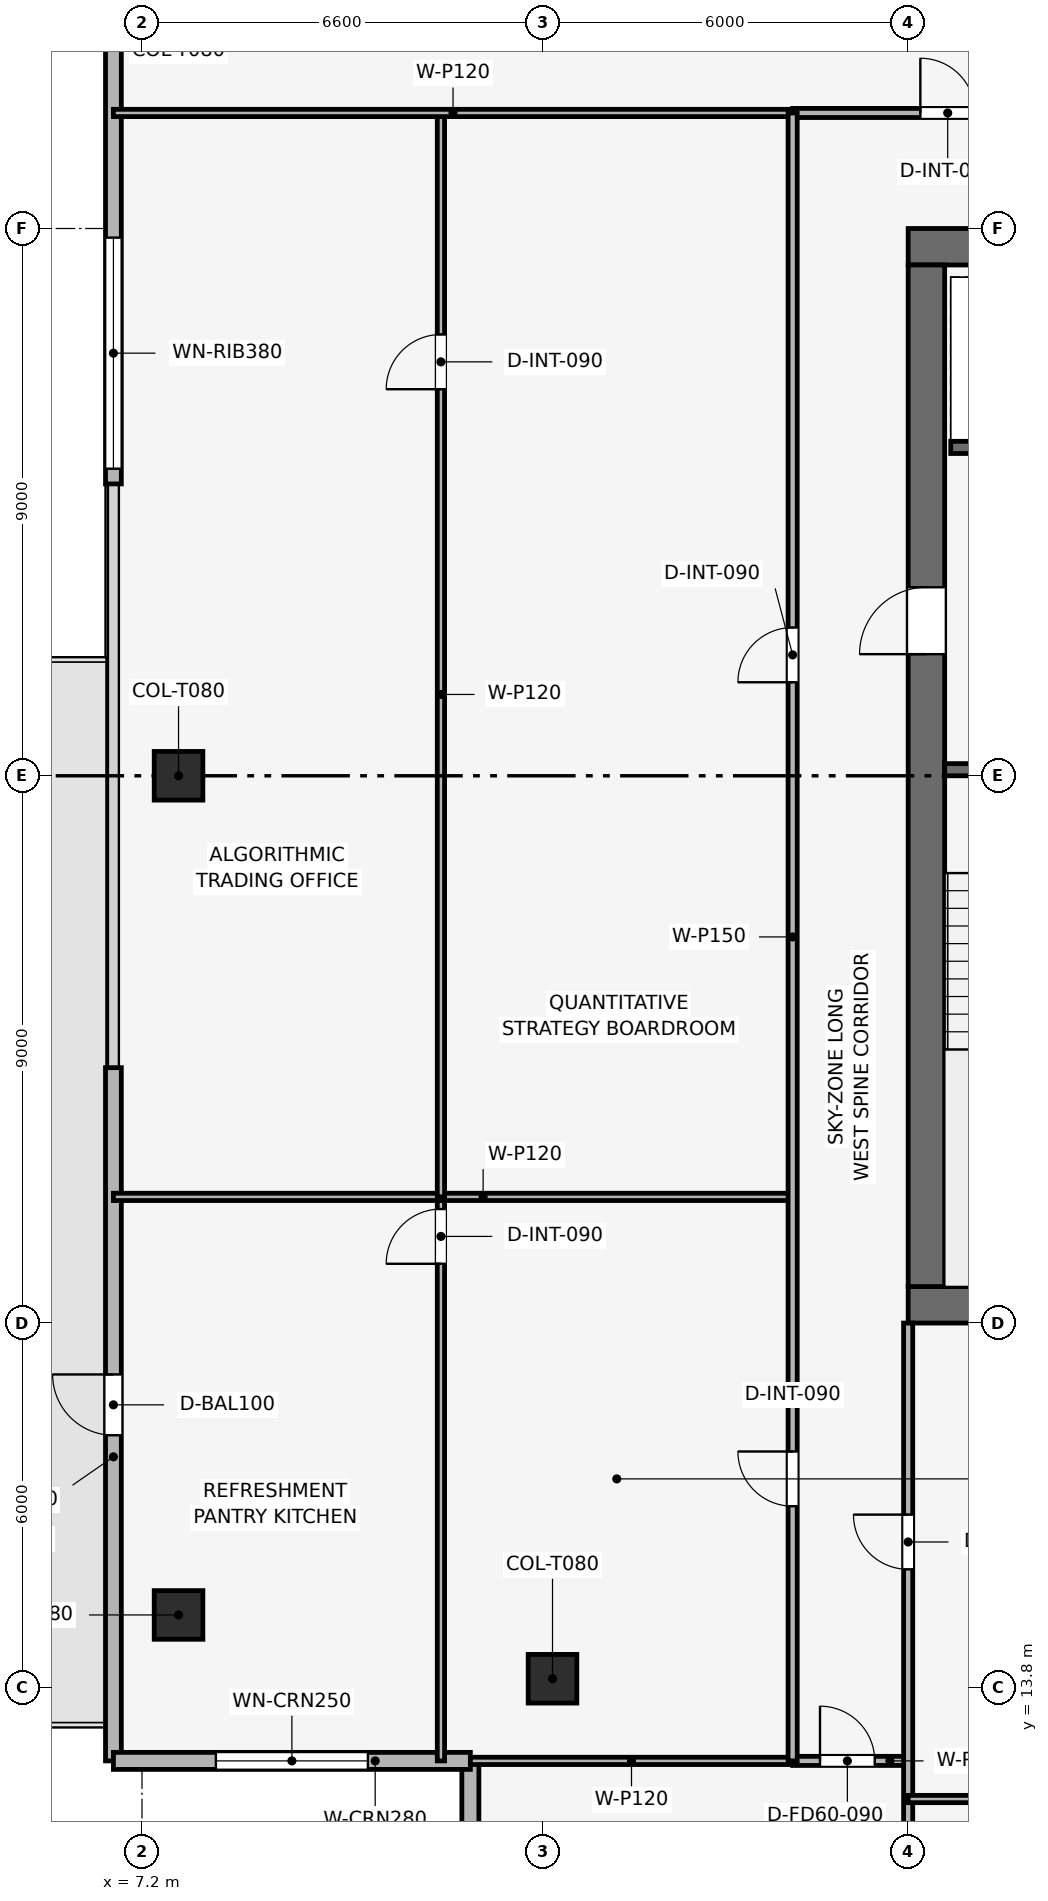
"""IFC4 building model, lengths in metres.
Left out: names, types, materials, properties, quantities, classifications, styles, units other than length and angle.
Written with IfcOpenShell. Run it as: python <this file> out.ifc"""

import sys

from ifc_helpers import new_model, si_unit, direction, frame, frame_2d, origin, origin_2d, place, context, subcontext, project, spatial, rectangle, extrude, element, fill, save


model = new_model("IFC4")
c1 = context("Model", 3, precision=1e-05, world=origin(), true_north=direction((0.0, 1.0)))
c2 = subcontext(c1, "Body", "Model", "MODEL_VIEW")
j1 = project(units=[si_unit("LENGTHUNIT", "METRE"), si_unit("PLANEANGLEUNIT", "RADIAN")], contexts=[c1])
p1 = place(None, origin())
s1 = spatial("IfcSite", under=j1, at=p1, CompositionType="ELEMENT")
p2 = place(p1, origin())
s2 = spatial("IfcBuilding", under=s1, at=p2, CompositionType="ELEMENT")
p3 = place(p2, frame((0.0, 0.0, 340.5)))
s3 = spatial("IfcBuildingStorey", under=s2, at=p3, CompositionType="ELEMENT", Elevation=340.5)
p4 = place(p3, frame((19.8, 20.1, 0.0), z_axis=(0.0, 0.0, 1.0), x_axis=(1.0, 0.0, 0.0)))
e1 = element("IfcWall", 1, at=p4, inside=s3, PredefinedType="SHEAR", context=c2, shape_type="SweptSolid", body=[
    extrude(rectangle(XDim=18.0, YDim=0.6, at=frame_2d((9.0, 0.0))), origin(), (0.0, 0.0, 1.0), 3.75),
])
p5 = place(p3, frame((19.8, 37.5, 0.0), z_axis=(0.0, 0.0, 1.0), x_axis=(1.0, 0.0, 0.0)))
e2 = element("IfcWall", 2, at=p5, inside=s3, PredefinedType="SHEAR", context=c2, shape_type="SweptSolid", body=[
    extrude(rectangle(XDim=18.0, YDim=0.6, at=frame_2d((9.0, 0.0))), origin(), (0.0, 0.0, 1.0), 3.75),
])
p6 = place(p5, frame((7.05, 0.0, 0.0)))
e3 = element("IfcOpeningElement", 3, at=p6, cuts=e2, PredefinedType="OPENING", context=c2, shape_type="SweptSolid", body=[
    extrude(rectangle(XDim=1.1, YDim=2.15, at=frame_2d((0.55, 1.075))), frame((0.0, 0.31, 0.0), z_axis=(0.0, -1.0, 0.0), x_axis=(1.0, 0.0, 0.0)), (0.0, 0.0, 1.0), 0.62),
])
p7 = place(p3, frame((20.1, 20.4, 0.0), z_axis=(0.0, 0.0, 1.0), x_axis=(0.0, 1.0, 0.0)))
e4 = element("IfcWall", 4, at=p7, inside=s3, PredefinedType="SHEAR", context=c2, shape_type="SweptSolid", body=[
    extrude(rectangle(XDim=16.8, YDim=0.6, at=frame_2d((8.4, 0.0))), origin(), (0.0, 0.0, 1.0), 3.75),
])
p8 = place(p7, frame((10.4, 0.0, 0.0)))
e5 = element("IfcOpeningElement", 5, at=p8, cuts=e4, PredefinedType="OPENING", context=c2, shape_type="SweptSolid", body=[
    extrude(rectangle(XDim=1.1, YDim=2.15, at=frame_2d((0.55, 1.075))), frame((0.0, 0.31, 0.0), z_axis=(0.0, -1.0, 0.0), x_axis=(1.0, 0.0, 0.0)), (0.0, 0.0, 1.0), 0.62),
])
p9 = place(p3, frame((7.801, 28.8, 0.003), z_axis=(0.23339088867, 0.0, 0.972382997119), x_axis=(0.0, 1.0, 0.0)))
e6 = element("IfcColumn", 6, at=p9, inside=s3, PredefinedType="COLUMN", context=c2, shape_type="SweptSolid", body=[
    extrude(rectangle(XDim=0.8, YDim=0.8, at=origin_2d()), origin(), (0.0, 0.0, 1.0), 3.604),
])
p10 = place(p3, frame((7.801, 15.0, 0.003), z_axis=(0.233311539355, 0.026074003672, 0.972052401847), x_axis=(-0.111064752168, 0.993813171993, 0.0)))
e7 = element("IfcColumn", 7, at=p10, inside=s3, PredefinedType="COLUMN", context=c2, shape_type="SweptSolid", body=[
    extrude(rectangle(XDim=0.8, YDim=0.8, at=origin_2d()), origin(), (0.0, 0.0, 1.0), 3.605),
])
p11 = place(p3, frame((13.951, 13.951, 0.003), z_axis=(0.180469443862, 0.180469443862, 0.966882391847), x_axis=(-0.707106781187, 0.707106781187, 0.0)))
e8 = element("IfcColumn", 8, at=p11, inside=s3, PredefinedType="COLUMN", context=c2, shape_type="SweptSolid", body=[
    extrude(rectangle(XDim=0.8, YDim=0.8, at=origin_2d()), origin(), (0.0, 0.0, 1.0), 3.624),
])
p12 = place(p3, frame((6.73, 12.6, 0.0), z_axis=(0.0, 0.0, 1.0), x_axis=(0.0, 1.0, 0.0)))
e9 = element("IfcWall", 9, at=p12, inside=s3, PredefinedType="SOLIDWALL", context=c2, shape_type="SweptSolid", body=[
    extrude(rectangle(XDim=11.4, YDim=0.26, at=frame_2d((5.7, 0.0))), origin(), (0.0, 0.0, 1.0), 3.51),
])
p13 = place(p12, frame((5.355, 0.0, 0.0)))
e10 = element("IfcOpeningElement", 10, at=p13, cuts=e9, PredefinedType="OPENING", context=c2, shape_type="SweptSolid", body=[
    extrude(rectangle(XDim=1.0, YDim=2.2, at=frame_2d((0.5, 1.1))), frame((0.0, 0.14, 0.0), z_axis=(0.0, -1.0, 0.0), x_axis=(1.0, 0.0, 0.0)), (0.0, 0.0, 1.0), 0.28),
])
p14 = place(p3, frame((6.73, 33.6, 0.0), z_axis=(0.0, 0.0, 1.0), x_axis=(0.0, 1.0, 0.0)))
e11 = element("IfcWall", 11, at=p14, inside=s3, PredefinedType="SOLIDWALL", context=c2, shape_type="SweptSolid", body=[
    extrude(rectangle(XDim=11.4, YDim=0.26, at=frame_2d((5.7, 0.0))), origin(), (0.0, 0.0, 1.0), 3.51),
])
p15 = place(p14, frame((0.25, 0.0, 0.9)))
e12 = element("IfcOpeningElement", 12, at=p15, cuts=e11, PredefinedType="OPENING", context=c2, shape_type="SweptSolid", body=[
    extrude(rectangle(XDim=3.8, YDim=1.9, at=frame_2d((1.9, 0.95))), frame((0.0, 0.14, 0.0), z_axis=(0.0, -1.0, 0.0), x_axis=(1.0, 0.0, 0.0)), (0.0, 0.0, 1.0), 0.28),
])
p16 = place(p3, frame((12.6, 6.73, 0.0), z_axis=(0.0, 0.0, 1.0), x_axis=(0.0, 1.0, 0.0)))
e13 = element("IfcWall", 13, at=p16, inside=s3, PredefinedType="SOLIDWALL", context=c2, shape_type="SweptSolid", body=[
    extrude(rectangle(XDim=5.87, YDim=0.28, at=frame_2d((2.935, 0.0))), origin(), (0.0, 0.0, 1.0), 3.51),
])
p17 = place(p16, frame((1.685, 0.0, 0.9)))
e14 = element("IfcOpeningElement", 14, at=p17, cuts=e13, PredefinedType="OPENING", context=c2, shape_type="SweptSolid", body=[
    extrude(rectangle(XDim=2.5, YDim=1.9, at=frame_2d((1.25, 0.95))), frame((0.0, 0.15, 0.0), z_axis=(0.0, -1.0, 0.0), x_axis=(1.0, 0.0, 0.0)), (0.0, 0.0, 1.0), 0.3),
])
p18 = place(p3, frame((12.6, 12.6, 0.0), z_axis=(0.0, 0.0, 1.0), x_axis=(-1.0, 0.0, 0.0)))
e15 = element("IfcWall", 15, at=p18, inside=s3, PredefinedType="SOLIDWALL", context=c2, shape_type="SweptSolid", body=[
    extrude(rectangle(XDim=5.87, YDim=0.28, at=frame_2d((2.935, 0.0))), origin(), (0.0, 0.0, 1.0), 3.51),
])
p19 = place(p18, frame((1.685, 0.0, 0.9)))
e16 = element("IfcOpeningElement", 16, at=p19, cuts=e15, PredefinedType="OPENING", context=c2, shape_type="SweptSolid", body=[
    extrude(rectangle(XDim=2.5, YDim=1.9, at=frame_2d((1.25, 0.95))), frame((0.0, 0.15, 0.0), z_axis=(0.0, -1.0, 0.0), x_axis=(1.0, 0.0, 0.0)), (0.0, 0.0, 1.0), 0.3),
])
p20 = place(p3, frame((20.4, 28.9, 0.0), z_axis=(0.0, 0.0, 1.0), x_axis=(1.0, 0.0, 0.0)))
e17 = element("IfcWall", 17, at=p20, inside=s3, PredefinedType="SHEAR", context=c2, shape_type="SweptSolid", body=[
    extrude(rectangle(XDim=3.15, YDim=0.2, at=frame_2d((1.575, 0.0))), origin(), (0.0, 0.0, 1.0), 3.51),
])
p21 = place(p20, frame((0.8, 0.0, 0.0)))
e18 = element("IfcOpeningElement", 18, at=p21, cuts=e17, PredefinedType="OPENING", context=c2, shape_type="SweptSolid", body=[
    extrude(rectangle(XDim=1.0, YDim=2.1, at=frame_2d((0.5, 1.05))), frame((0.0, 0.11, 0.0), z_axis=(0.0, -1.0, 0.0), x_axis=(1.0, 0.0, 0.0)), (0.0, 0.0, 1.0), 0.22),
])
p22 = place(p3, frame((20.5, 34.2, 0.0), z_axis=(0.0, 0.0, 1.0), x_axis=(1.0, 0.0, 0.0)))
e19 = element("IfcWall", 19, at=p22, inside=s3, PredefinedType="SHEAR", context=c2, shape_type="SweptSolid", body=[
    extrude(rectangle(XDim=3.05, YDim=0.2, at=frame_2d((1.525, 0.0))), origin(), (0.0, 0.0, 1.0), 3.51),
])
p23 = place(p22, frame((0.75, 0.0, 0.0)))
e20 = element("IfcOpeningElement", 20, at=p23, cuts=e19, PredefinedType="OPENING", context=c2, shape_type="SweptSolid", body=[
    extrude(rectangle(XDim=1.1, YDim=2.15, at=frame_2d((0.55, 1.075))), frame((0.0, 0.11, 0.0), z_axis=(0.0, -1.0, 0.0), x_axis=(1.0, 0.0, 0.0)), (0.0, 0.0, 1.0), 0.22),
])
p24 = place(p3, frame((12.116, 12.6, 0.0), z_axis=(0.0, 0.0, 1.0), x_axis=(0.0, 1.0, 0.0)))
e21 = element("IfcWall", 21, at=p24, inside=s3, PredefinedType="PARTITIONING", context=c2, shape_type="SweptSolid", body=[
    extrude(rectangle(XDim=9.275, YDim=0.12, at=frame_2d((4.637, 0.0))), origin(), (0.0, 0.0, 1.0), 3.095),
])
p25 = place(p24, frame((8.175, 0.0, 0.0)))
e22 = element("IfcOpeningElement", 22, at=p25, cuts=e21, PredefinedType="OPENING", context=c2, shape_type="SweptSolid", body=[
    extrude(rectangle(XDim=0.9, YDim=2.1, at=frame_2d((0.45, 1.05))), frame((0.0, 0.07, 0.0), z_axis=(0.0, -1.0, 0.0), x_axis=(1.0, 0.0, 0.0)), (0.0, 0.0, 1.0), 0.14),
])
p26 = place(p3, frame((6.73, 21.875, 0.0), z_axis=(0.0, 0.0, 1.0), x_axis=(1.0, 0.0, 0.0)))
e23 = element("IfcWall", 23, at=p26, inside=s3, PredefinedType="PARTITIONING", context=c2, shape_type="SweptSolid", body=[
    extrude(rectangle(XDim=11.17, YDim=0.12, at=frame_2d((5.585, 0.0))), origin(), (0.0, 0.0, 1.0), 3.135),
])
p27 = place(p3, frame((12.116, 21.875, 0.0), z_axis=(0.0, 0.0, 1.0), x_axis=(0.0, 1.0, 0.0)))
e24 = element("IfcWall", 24, at=p27, inside=s3, PredefinedType="PARTITIONING", context=c2, shape_type="SweptSolid", body=[
    extrude(rectangle(XDim=17.825, YDim=0.12, at=frame_2d((8.913, 0.0))), origin(), (0.0, 0.0, 1.0), 3.095),
])
p28 = place(p27, frame((13.282, 0.0, 0.0)))
e25 = element("IfcOpeningElement", 25, at=p28, cuts=e24, PredefinedType="OPENING", context=c2, shape_type="SweptSolid", body=[
    extrude(rectangle(XDim=0.9, YDim=2.1, at=frame_2d((0.45, 1.05))), frame((0.0, 0.07, 0.0), z_axis=(0.0, -1.0, 0.0), x_axis=(1.0, 0.0, 0.0)), (0.0, 0.0, 1.0), 0.14),
])
p29 = place(p3, frame((12.6, 12.6, 0.0), z_axis=(0.0, 0.0, 1.0), x_axis=(1.0, 0.0, 0.0)))
e26 = element("IfcWall", 26, at=p29, inside=s3, PredefinedType="PARTITIONING", context=c2, shape_type="SweptSolid", body=[
    extrude(rectangle(XDim=5.3, YDim=0.12, at=frame_2d((2.65, 0.0))), origin(), (0.0, 0.0, 1.0), 3.195),
])
p30 = place(p3, frame((17.9, 12.6, 0.0), z_axis=(0.0, 0.0, 1.0), x_axis=(1.0, 0.0, 0.0)))
e27 = element("IfcWall", 27, at=p30, inside=s3, PredefinedType="PARTITIONING", context=c2, shape_type="SweptSolid", body=[
    extrude(rectangle(XDim=1.9, YDim=0.15, at=frame_2d((0.95, 0.0))), origin(), (0.0, 0.0, 1.0), 3.51),
])
p31 = place(p30, frame((0.45, 0.0, 0.0)))
e28 = element("IfcOpeningElement", 28, at=p31, cuts=e27, PredefinedType="OPENING", context=c2, shape_type="SweptSolid", body=[
    extrude(rectangle(XDim=0.9, YDim=2.1, at=frame_2d((0.45, 1.05))), frame((0.0, 0.085, 0.0), z_axis=(0.0, -1.0, 0.0), x_axis=(1.0, 0.0, 0.0)), (0.0, 0.0, 1.0), 0.17),
])
p32 = place(p3, frame((19.8, 6.73, 0.0), z_axis=(0.0, 0.0, 1.0), x_axis=(0.0, 1.0, 0.0)))
e29 = element("IfcWall", 29, at=p32, inside=s3, PredefinedType="PARTITIONING", context=c2, shape_type="SweptSolid", body=[
    extrude(rectangle(XDim=13.07, YDim=0.15, at=frame_2d((6.535, 0.0))), origin(), (0.0, 0.0, 1.0), 3.095),
])
p33 = place(p32, frame((9.02, 0.0, 0.0)))
e30 = element("IfcOpeningElement", 30, at=p33, cuts=e29, PredefinedType="OPENING", context=c2, shape_type="SweptSolid", body=[
    extrude(rectangle(XDim=0.9, YDim=2.1, at=frame_2d((0.45, 1.05))), frame((0.0, 0.085, 0.0), z_axis=(0.0, -1.0, 0.0), x_axis=(1.0, 0.0, 0.0)), (0.0, 0.0, 1.0), 0.17),
])
p34 = place(p3, frame((19.8, 11.973, 0.0), z_axis=(0.0, 0.0, 1.0), x_axis=(1.0, 0.0, 0.0)))
e31 = element("IfcWall", 31, at=p34, inside=s3, PredefinedType="PARTITIONING", context=c2, shape_type="SweptSolid", body=[
    extrude(rectangle(XDim=25.2, YDim=0.12, at=frame_2d((12.6, 0.0))), origin(), (0.0, 0.0, 1.0), 3.095),
])
p35 = place(p34, frame((15.138, 0.0, 0.0)))
e32 = element("IfcOpeningElement", 32, at=p35, cuts=e31, PredefinedType="OPENING", context=c2, shape_type="SweptSolid", body=[
    extrude(rectangle(XDim=0.9, YDim=2.1, at=frame_2d((0.45, 1.05))), frame((0.0, 0.07, 0.0), z_axis=(0.0, -1.0, 0.0), x_axis=(1.0, 0.0, 0.0)), (0.0, 0.0, 1.0), 0.14),
])
p36 = place(p3, frame((6.73, 39.7, 0.0), z_axis=(0.0, 0.0, 1.0), x_axis=(1.0, 0.0, 0.0)))
e33 = element("IfcWall", 33, at=p36, inside=s3, PredefinedType="PARTITIONING", context=c2, shape_type="SweptSolid", body=[
    extrude(rectangle(XDim=11.17, YDim=0.12, at=frame_2d((5.585, 0.0))), origin(), (0.0, 0.0, 1.0), 3.095),
])
p37 = place(p3, frame((17.9, 39.7, 0.0), z_axis=(0.0, 0.0, 1.0), x_axis=(1.0, 0.0, 0.0)))
e34 = element("IfcWall", 34, at=p37, inside=s3, PredefinedType="PARTITIONING", context=c2, shape_type="SweptSolid", body=[
    extrude(rectangle(XDim=21.8, YDim=0.15, at=frame_2d((10.9, 0.0))), origin(), (0.0, 0.0, 1.0), 3.095),
])
p38 = place(p37, frame((2.1, 0.0, 0.0)))
e35 = element("IfcOpeningElement", 35, at=p38, cuts=e34, PredefinedType="OPENING", context=c2, shape_type="SweptSolid", body=[
    extrude(rectangle(XDim=0.9, YDim=2.1, at=frame_2d((0.45, 1.05))), frame((0.0, 0.085, 0.0), z_axis=(0.0, -1.0, 0.0), x_axis=(1.0, 0.0, 0.0)), (0.0, 0.0, 1.0), 0.17),
])
p39 = place(p37, frame((6.05, 0.0, 0.0)))
e36 = element("IfcOpeningElement", 36, at=p39, cuts=e34, PredefinedType="OPENING", context=c2, shape_type="SweptSolid", body=[
    extrude(rectangle(XDim=0.9, YDim=2.1, at=frame_2d((0.45, 1.05))), frame((0.0, 0.085, 0.0), z_axis=(0.0, -1.0, 0.0), x_axis=(1.0, 0.0, 0.0)), (0.0, 0.0, 1.0), 0.17),
])
p40 = place(p37, frame((8.95, 0.0, 0.0)))
e37 = element("IfcOpeningElement", 37, at=p40, cuts=e34, PredefinedType="OPENING", context=c2, shape_type="SweptSolid", body=[
    extrude(rectangle(XDim=0.9, YDim=2.1, at=frame_2d((0.45, 1.05))), frame((0.0, 0.085, 0.0), z_axis=(0.0, -1.0, 0.0), x_axis=(1.0, 0.0, 0.0)), (0.0, 0.0, 1.0), 0.17),
])
p41 = place(p37, frame((11.7, 0.0, 0.0)))
e38 = element("IfcOpeningElement", 38, at=p41, cuts=e34, PredefinedType="OPENING", context=c2, shape_type="SweptSolid", body=[
    extrude(rectangle(XDim=0.95, YDim=2.1, at=frame_2d((0.475, 1.05))), frame((0.0, 0.085, 0.0), z_axis=(0.0, -1.0, 0.0), x_axis=(1.0, 0.0, 0.0)), (0.0, 0.0, 1.0), 0.17),
])
p42 = place(p37, frame((17.2, 0.0, 0.0)))
e39 = element("IfcOpeningElement", 39, at=p42, cuts=e34, PredefinedType="OPENING", context=c2, shape_type="SweptSolid", body=[
    extrude(rectangle(XDim=0.9, YDim=2.1, at=frame_2d((0.45, 1.05))), frame((0.0, 0.085, 0.0), z_axis=(0.0, -1.0, 0.0), x_axis=(1.0, 0.0, 0.0)), (0.0, 0.0, 1.0), 0.17),
])
p43 = place(p3, frame((17.9, 12.6, 0.0), z_axis=(0.0, 0.0, 1.0), x_axis=(0.0, 1.0, 0.0)))
e40 = element("IfcWall", 40, at=p43, inside=s3, PredefinedType="PARTITIONING", context=c2, shape_type="SweptSolid", body=[
    extrude(rectangle(XDim=27.1, YDim=0.15, at=frame_2d((13.55, 0.0))), origin(), (0.0, 0.0, 1.0), 3.095),
])
p44 = place(p43, frame((4.188, 0.0, 0.0)))
e41 = element("IfcOpeningElement", 41, at=p44, cuts=e40, PredefinedType="OPENING", context=c2, shape_type="SweptSolid", body=[
    extrude(rectangle(XDim=0.9, YDim=2.1, at=frame_2d((0.45, 1.05))), frame((0.0, 0.085, 0.0), z_axis=(0.0, -1.0, 0.0), x_axis=(1.0, 0.0, 0.0)), (0.0, 0.0, 1.0), 0.17),
])
p45 = place(p43, frame((17.738, 0.0, 0.0)))
e42 = element("IfcOpeningElement", 42, at=p45, cuts=e40, PredefinedType="OPENING", context=c2, shape_type="SweptSolid", body=[
    extrude(rectangle(XDim=0.9, YDim=2.1, at=frame_2d((0.45, 1.05))), frame((0.0, 0.085, 0.0), z_axis=(0.0, -1.0, 0.0), x_axis=(1.0, 0.0, 0.0)), (0.0, 0.0, 1.0), 0.17),
])
p46 = place(p13, origin())
e43 = element("IfcDoor", 43, at=p46, inside=s3, OperationType="SINGLE_SWING_RIGHT", PredefinedType="DOOR", context=c2, shape_type="SweptSolid", body=[
    extrude(rectangle(XDim=1.0, YDim=2.2, at=frame_2d((0.5, 1.1))), frame((0.0, 0.025, 0.0), z_axis=(0.0, -1.0, 0.0), x_axis=(1.0, 0.0, 0.0)), (0.0, 0.0, 1.0), 0.05),
])
fill(e10, e43)
p47 = place(p15, origin())
e44 = element("IfcWindow", 44, at=p47, inside=s3, PartitioningType="SINGLE_PANEL", PredefinedType="WINDOW", context=c2, shape_type="SweptSolid", body=[
    extrude(rectangle(XDim=3.8, YDim=1.9, at=frame_2d((1.9, 0.95))), frame((0.0, 0.03, 0.0), z_axis=(0.0, -1.0, 0.0), x_axis=(1.0, 0.0, 0.0)), (0.0, 0.0, 1.0), 0.06),
])
fill(e12, e44)
p48 = place(p19, origin())
e45 = element("IfcWindow", 45, at=p48, inside=s3, PartitioningType="SINGLE_PANEL", PredefinedType="WINDOW", context=c2, shape_type="SweptSolid", body=[
    extrude(rectangle(XDim=2.5, YDim=1.9, at=frame_2d((1.25, 0.95))), frame((0.0, 0.03, 0.0), z_axis=(0.0, -1.0, 0.0), x_axis=(1.0, 0.0, 0.0)), (0.0, 0.0, 1.0), 0.06),
])
fill(e16, e45)
p49 = place(p25, origin())
e46 = element("IfcDoor", 46, at=p49, inside=s3, OperationType="SINGLE_SWING_LEFT", PredefinedType="DOOR", context=c2, shape_type="SweptSolid", body=[
    extrude(rectangle(XDim=0.9, YDim=2.1, at=frame_2d((0.45, 1.05))), frame((0.0, 0.025, 0.0), z_axis=(0.0, -1.0, 0.0), x_axis=(1.0, 0.0, 0.0)), (0.0, 0.0, 1.0), 0.05),
])
fill(e22, e46)
p50 = place(p28, origin())
e47 = element("IfcDoor", 47, at=p50, inside=s3, OperationType="SINGLE_SWING_LEFT", PredefinedType="DOOR", context=c2, shape_type="SweptSolid", body=[
    extrude(rectangle(XDim=0.9, YDim=2.1, at=frame_2d((0.45, 1.05))), frame((0.0, 0.025, 0.0), z_axis=(0.0, -1.0, 0.0), x_axis=(1.0, 0.0, 0.0)), (0.0, 0.0, 1.0), 0.05),
])
fill(e25, e47)
p51 = place(p31, origin())
e48 = element("IfcDoor", 48, at=p51, inside=s3, OperationType="SINGLE_SWING_LEFT", PredefinedType="DOOR", context=c2, shape_type="SweptSolid", body=[
    extrude(rectangle(XDim=0.9, YDim=2.1, at=frame_2d((0.45, 1.05))), frame((0.0, 0.025, 0.0), z_axis=(0.0, -1.0, 0.0), x_axis=(1.0, 0.0, 0.0)), (0.0, 0.0, 1.0), 0.05),
])
fill(e28, e48)
p52 = place(p33, origin())
e49 = element("IfcDoor", 49, at=p52, inside=s3, OperationType="SINGLE_SWING_RIGHT", PredefinedType="DOOR", context=c2, shape_type="SweptSolid", body=[
    extrude(rectangle(XDim=0.9, YDim=2.1, at=frame_2d((0.45, 1.05))), frame((0.0, 0.025, 0.0), z_axis=(0.0, -1.0, 0.0), x_axis=(1.0, 0.0, 0.0)), (0.0, 0.0, 1.0), 0.05),
])
fill(e30, e49)
p53 = place(p38, origin())
e50 = element("IfcDoor", 50, at=p53, inside=s3, OperationType="SINGLE_SWING_LEFT", PredefinedType="DOOR", context=c2, shape_type="SweptSolid", body=[
    extrude(rectangle(XDim=0.9, YDim=2.1, at=frame_2d((0.45, 1.05))), frame((0.0, 0.025, 0.0), z_axis=(0.0, -1.0, 0.0), x_axis=(1.0, 0.0, 0.0)), (0.0, 0.0, 1.0), 0.05),
])
fill(e35, e50)
p54 = place(p44, origin())
e51 = element("IfcDoor", 51, at=p54, inside=s3, OperationType="SINGLE_SWING_RIGHT", PredefinedType="DOOR", context=c2, shape_type="SweptSolid", body=[
    extrude(rectangle(XDim=0.9, YDim=2.1, at=frame_2d((0.45, 1.05))), frame((0.0, 0.025, 0.0), z_axis=(0.0, -1.0, 0.0), x_axis=(1.0, 0.0, 0.0)), (0.0, 0.0, 1.0), 0.05),
])
fill(e41, e51)
p55 = place(p45, origin())
e52 = element("IfcDoor", 52, at=p55, inside=s3, OperationType="SINGLE_SWING_LEFT", PredefinedType="DOOR", context=c2, shape_type="SweptSolid", body=[
    extrude(rectangle(XDim=0.9, YDim=2.1, at=frame_2d((0.45, 1.05))), frame((0.0, 0.025, 0.0), z_axis=(0.0, -1.0, 0.0), x_axis=(1.0, 0.0, 0.0)), (0.0, 0.0, 1.0), 0.05),
])
fill(e42, e52)
p56 = place(p8, origin())
e53 = element("IfcDoor", 53, at=p56, inside=s3, OperationType="SINGLE_SWING_LEFT", PredefinedType="DOOR", context=c2, shape_type="SweptSolid", body=[
    extrude(rectangle(XDim=1.1, YDim=2.15, at=frame_2d((0.55, 1.075))), frame((0.0, 0.025, 0.0), z_axis=(0.0, -1.0, 0.0), x_axis=(1.0, 0.0, 0.0)), (0.0, 0.0, 1.0), 0.05),
])
fill(e5, e53)
save(model, sys.argv[1])
